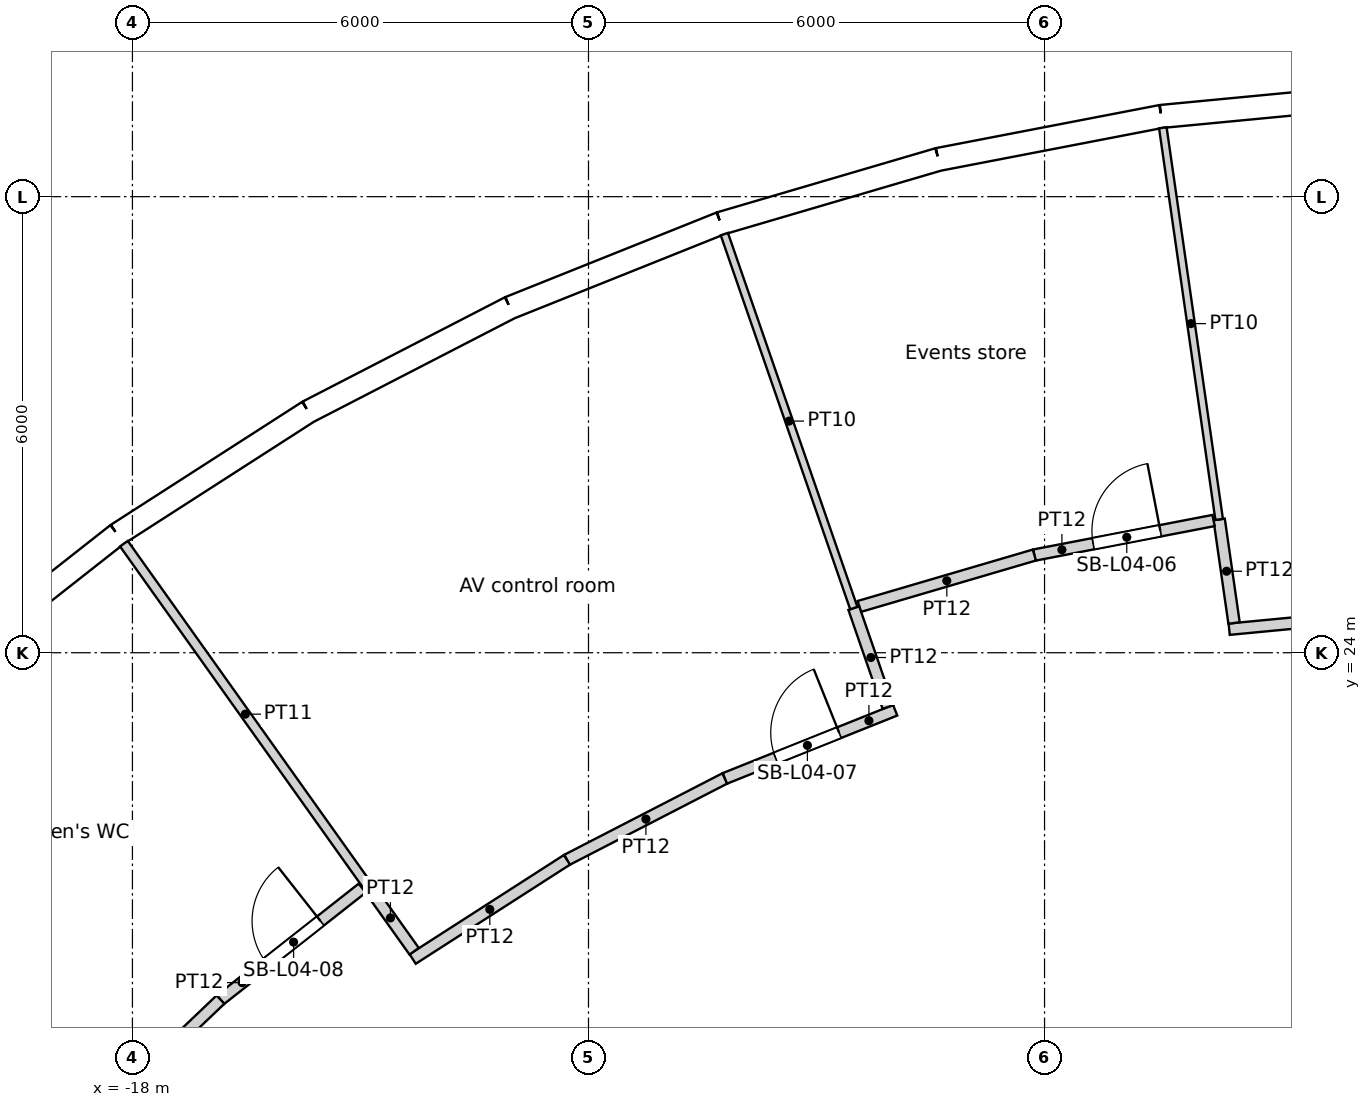
"""IFC4 building model, lengths in metres.
Left out: names, types, materials, properties, quantities, classifications, styles, units other than length and angle.
Written with IfcOpenShell. Run it as: python <this file> out.ifc"""

import sys

from ifc_helpers import new_model, si_unit, direction, frame, frame_2d, origin, origin_2d, place, context, subcontext, project, spatial, rectangle, circle, extrude, element, fill, save


model = new_model("IFC4")
c1 = context("Model", 3, precision=1e-05, world=origin(), true_north=direction((0.0, 1.0)))
c2 = subcontext(c1, "Body", "Model", "MODEL_VIEW")
j1 = project(units=[si_unit("LENGTHUNIT", "METRE"), si_unit("PLANEANGLEUNIT", "RADIAN")], contexts=[c1])
p1 = place(None, origin())
s1 = spatial("IfcSite", under=j1, at=p1, CompositionType="ELEMENT")
p2 = place(p1, origin())
s2 = spatial("IfcBuilding", under=s1, at=p2, CompositionType="ELEMENT")
p3 = place(p2, frame((0.0, 0.0, 23.4)))
s3 = spatial("IfcBuildingStorey", under=s2, at=p3, CompositionType="ELEMENT", Elevation=23.4)
for number, where, z_axis, x_axis in (
    (1, (-4.309, 29.966, 0.0), (0.0, 0.0, 1.0), (1.0, 0.0, 0.0)),
    (2, (-9.902, 28.61, 0.0), (0.0, 0.0, 1.0), (1.0, 0.0, 0.0)),
    (3, (-15.137, 26.219, 0.0), (0.0, 0.0, 1.0), (1.0, 0.0, 0.0)),
):
    element("IfcColumn", number, at=place(p3, frame(where, z_axis=z_axis, x_axis=x_axis)), inside=s3, PredefinedType="COLUMN", context=c2, shape_type="SweptSolid", body=[
        extrude(circle(Radius=0.7, at=origin_2d()), origin(), (0.0, 0.0, 1.0), 4.8),
    ])
for number, where, z_axis, x_axis in (
    (4, (-7.04, 23.516, 0.0), (0.0, 0.0, 1.0), (1.0, 0.0, 0.0)),
    (5, (-12.274, 21.259, 0.0), (0.0, 0.0, 1.0), (1.0, 0.0, 0.0)),
):
    element("IfcColumn", number, at=place(p3, frame(where, z_axis=z_axis, x_axis=x_axis)), inside=s3, PredefinedType="COLUMN", context=c2, shape_type="SweptSolid", body=[
        extrude(circle(Radius=0.75, at=origin_2d()), origin(), (0.0, 0.0, 1.0), 4.8),
    ])
p4 = place(p3, frame((-4.188, 18.35, 0.0), z_axis=(0.0, 0.0, 1.0), x_axis=(1.0, 0.0, 0.0)))
e6 = element("IfcColumn", 6, at=p4, inside=s3, PredefinedType="COLUMN", context=c2, shape_type="SweptSolid", body=[
    extrude(circle(Radius=0.8, at=origin_2d()), origin(), (0.0, 0.0, 1.0), 4.8),
])
p5 = place(p3, frame((-1.493, 31.339, 0.0), z_axis=(0.0, 0.0, 1.0), x_axis=(-0.99547560533, -0.095017467833, 0.0)))
e7 = element("IfcWall", 7, at=p5, inside=s3, PredefinedType="SOLIDWALL", context=c2, shape_type="SweptSolid", body=[
    extrude(rectangle(XDim=2.986, YDim=0.3, at=frame_2d((1.493, 0.0))), origin(), (0.0, 0.0, 1.0), 4.35),
])
p6 = place(p5, frame((1.493, 0.0, 2.0)))
e8 = element("IfcOpeningElement", 8, at=p6, cuts=e7, PredefinedType="OPENING", context=c2, shape_type="SweptSolid", body=[
    extrude(circle(Radius=1.2, at=origin_2d()), frame((0.0, 0.16, 0.0), z_axis=(0.0, -1.0, 0.0), x_axis=(1.0, 0.0, 0.0)), (0.0, 0.0, 1.0), 0.32),
])
p7 = place(p3, frame((-4.465, 31.055, 0.0), z_axis=(0.0, 0.0, 1.0), x_axis=(-0.981918853666, -0.189302310646, 0.0)))
e9 = element("IfcWall", 9, at=p7, inside=s3, PredefinedType="SOLIDWALL", context=c2, shape_type="SweptSolid", body=[
    extrude(rectangle(XDim=2.986, YDim=0.3, at=frame_2d((1.493, 0.0))), origin(), (0.0, 0.0, 1.0), 3.85),
])
p8 = place(p7, frame((1.493, 0.0, 2.0)))
e10 = element("IfcOpeningElement", 10, at=p8, cuts=e9, PredefinedType="OPENING", context=c2, shape_type="SweptSolid", body=[
    extrude(circle(Radius=1.2, at=origin_2d()), frame((0.0, 0.16, 0.0), z_axis=(0.0, -1.0, 0.0), x_axis=(1.0, 0.0, 0.0)), (0.0, 0.0, 1.0), 0.32),
])
p9 = place(p3, frame((-7.397, 30.49, 0.0), z_axis=(0.0, 0.0, 1.0), x_axis=(-0.959502108153, -0.281701445593, 0.0)))
e11 = element("IfcWall", 11, at=p9, inside=s3, PredefinedType="SOLIDWALL", context=c2, shape_type="SweptSolid", body=[
    extrude(rectangle(XDim=2.986, YDim=0.3, at=frame_2d((1.493, 0.0))), origin(), (0.0, 0.0, 1.0), 4.35),
])
p10 = place(p9, frame((1.493, 0.0, 2.0)))
e12 = element("IfcOpeningElement", 12, at=p10, cuts=e11, PredefinedType="OPENING", context=c2, shape_type="SweptSolid", body=[
    extrude(circle(Radius=1.2, at=origin_2d()), frame((0.0, 0.16, 0.0), z_axis=(0.0, -1.0, 0.0), x_axis=(1.0, 0.0, 0.0)), (0.0, 0.0, 1.0), 0.32),
])
p11 = place(p3, frame((-10.261, 29.649, 0.0), z_axis=(0.0, 0.0, 1.0), x_axis=(-0.928380795373, -0.371630325434, 0.0)))
e13 = element("IfcWall", 13, at=p11, inside=s3, PredefinedType="SOLIDWALL", context=c2, shape_type="SweptSolid", body=[
    extrude(rectangle(XDim=2.986, YDim=0.3, at=frame_2d((1.493, 0.0))), origin(), (0.0, 0.0, 1.0), 4.35),
])
p12 = place(p11, frame((1.493, 0.0, 2.0)))
e14 = element("IfcOpeningElement", 14, at=p12, cuts=e13, PredefinedType="OPENING", context=c2, shape_type="SweptSolid", body=[
    extrude(circle(Radius=1.2, at=origin_2d()), frame((0.0, 0.16, 0.0), z_axis=(0.0, -1.0, 0.0), x_axis=(1.0, 0.0, 0.0)), (0.0, 0.0, 1.0), 0.32),
])
p13 = place(p3, frame((-13.033, 28.539, 0.0), z_axis=(0.0, 0.0, 1.0), x_axis=(-0.888831268481, -0.458234630043, 0.0)))
e15 = element("IfcWall", 15, at=p13, inside=s3, PredefinedType="SOLIDWALL", context=c2, shape_type="SweptSolid", body=[
    extrude(rectangle(XDim=2.986, YDim=0.3, at=frame_2d((1.493, 0.0))), origin(), (0.0, 0.0, 1.0), 3.85),
])
p14 = place(p13, frame((1.493, 0.0, 2.0)))
e16 = element("IfcOpeningElement", 16, at=p14, cuts=e15, PredefinedType="OPENING", context=c2, shape_type="SweptSolid", body=[
    extrude(circle(Radius=1.2, at=origin_2d()), frame((0.0, 0.16, 0.0), z_axis=(0.0, -1.0, 0.0), x_axis=(1.0, 0.0, 0.0)), (0.0, 0.0, 1.0), 0.32),
])
p15 = place(p3, frame((-15.687, 27.171, 0.0), z_axis=(0.0, 0.0, 1.0), x_axis=(-0.841242231846, -0.540658401727, 0.0)))
e17 = element("IfcWall", 17, at=p15, inside=s3, PredefinedType="SOLIDWALL", context=c2, shape_type="SweptSolid", body=[
    extrude(rectangle(XDim=2.986, YDim=0.3, at=frame_2d((1.493, 0.0))), origin(), (0.0, 0.0, 1.0), 4.35),
])
p16 = place(p15, frame((1.493, 0.0, 2.0)))
e18 = element("IfcOpeningElement", 18, at=p16, cuts=e17, PredefinedType="OPENING", context=c2, shape_type="SweptSolid", body=[
    extrude(circle(Radius=1.2, at=origin_2d()), frame((0.0, 0.16, 0.0), z_axis=(0.0, -1.0, 0.0), x_axis=(1.0, 0.0, 0.0)), (0.0, 0.0, 1.0), 0.32),
])
p17 = place(p3, frame((-18.199, 25.557, 0.0), z_axis=(0.0, 0.0, 1.0), x_axis=(-0.786043032847, -0.618171780747, 0.0)))
e19 = element("IfcWall", 19, at=p17, inside=s3, PredefinedType="SOLIDWALL", context=c2, shape_type="SweptSolid", body=[
    extrude(rectangle(XDim=2.986, YDim=0.3, at=frame_2d((1.493, 0.0))), origin(), (0.0, 0.0, 1.0), 4.35),
])
p18 = place(p17, frame((1.493, 0.0, 2.0)))
e20 = element("IfcOpeningElement", 20, at=p18, cuts=e19, PredefinedType="OPENING", context=c2, shape_type="SweptSolid", body=[
    extrude(circle(Radius=1.2, at=origin_2d()), frame((0.0, 0.16, 0.0), z_axis=(0.0, -1.0, 0.0), x_axis=(1.0, 0.0, 0.0)), (0.0, 0.0, 1.0), 0.32),
])
p19 = place(p3, frame((-18.112, 25.435, 0.0), z_axis=(0.0, 0.0, 1.0), x_axis=(0.580038022369, -0.814589401236, 0.0)))
e21 = element("IfcWall", 21, at=p19, inside=s3, PredefinedType="PARTITIONING", context=c2, shape_type="SweptSolid", body=[
    extrude(rectangle(XDim=5.506, YDim=0.125, at=frame_2d((2.753, 0.0))), origin(), (0.0, 0.0, 1.0), 3.75),
])
p20 = place(p3, frame((-16.842, 19.436, 0.0), z_axis=(0.0, 0.0, 1.0), x_axis=(-0.723748787545, -0.690063542384, 0.0)))
e22 = element("IfcWall", 22, at=p20, inside=s3, PredefinedType="PARTITIONING", context=c2, shape_type="SweptSolid", body=[
    extrude(rectangle(XDim=2.522, YDim=0.15, at=frame_2d((1.261, 0.0))), origin(), (0.0, 0.0, 1.0), 3.75),
])
p21 = place(p3, frame((-16.842, 19.436, 0.0), z_axis=(0.0, 0.0, 1.0), x_axis=(0.786071894696, 0.618135079387, 0.0)))
e23 = element("IfcWall", 23, at=p21, inside=s3, PredefinedType="PARTITIONING", context=c2, shape_type="SweptSolid", body=[
    extrude(rectangle(XDim=2.373, YDim=0.15, at=frame_2d((1.186, 0.0))), origin(), (0.0, 0.0, 1.0), 3.75),
])
p22 = place(p21, frame((0.774, 0.0, 0.0)))
e24 = element("IfcOpeningElement", 24, at=p22, cuts=e23, PredefinedType="OPENING", context=c2, shape_type="SweptSolid", body=[
    extrude(rectangle(XDim=0.9, YDim=2.1, at=frame_2d((0.45, 1.05))), frame((0.0, 0.075, 0.0), z_axis=(0.0, -1.0, 0.0), x_axis=(1.0, 0.0, 0.0)), (0.0, 0.0, 1.0), 0.15),
])
p23 = place(p3, frame((-14.918, 20.949, 0.0), z_axis=(0.0, 0.0, 1.0), x_axis=(0.580035908562, -0.814590906393, 0.0)))
e25 = element("IfcWall", 25, at=p23, inside=s3, PredefinedType="PARTITIONING", context=c2, shape_type="SweptSolid", body=[
    extrude(rectangle(XDim=1.076, YDim=0.15, at=frame_2d((0.538, 0.0))), origin(), (0.0, 0.0, 1.0), 3.75),
])
p24 = place(p3, frame((-12.283, 21.275, 0.0), z_axis=(0.0, 0.0, 1.0), x_axis=(-0.8412573693, -0.540634847747, 0.0)))
e26 = element("IfcWall", 26, at=p24, inside=s3, PredefinedType="PARTITIONING", context=c2, shape_type="SweptSolid", body=[
    extrude(rectangle(XDim=2.413, YDim=0.15, at=frame_2d((1.207, 0.0))), origin(), (0.0, 0.0, 1.0), 3.75),
])
p25 = place(p3, frame((-10.212, 29.507, 0.0), z_axis=(0.0, 0.0, 1.0), x_axis=(0.327054188725, -0.945005586035, 0.0)))
e27 = element("IfcWall", 27, at=p25, inside=s3, PredefinedType="PARTITIONING", context=c2, shape_type="SweptSolid", body=[
    extrude(rectangle(XDim=5.206, YDim=0.1, at=frame_2d((2.603, 0.0))), origin(), (0.0, 0.0, 1.0), 3.75),
])
p26 = place(p3, frame((-10.205, 22.347, 0.0), z_axis=(0.0, 0.0, 1.0), x_axis=(-0.888845697941, -0.458206640339, 0.0)))
e28 = element("IfcWall", 28, at=p26, inside=s3, PredefinedType="PARTITIONING", context=c2, shape_type="SweptSolid", body=[
    extrude(rectangle(XDim=2.338, YDim=0.15, at=frame_2d((1.169, 0.0))), origin(), (0.0, 0.0, 1.0), 3.75),
])
p27 = place(p3, frame((-8.51, 24.587, 0.0), z_axis=(0.0, 0.0, 1.0), x_axis=(0.327061828961, -0.945002941814, 0.0)))
e29 = element("IfcWall", 29, at=p27, inside=s3, PredefinedType="PARTITIONING", context=c2, shape_type="SweptSolid", body=[
    extrude(rectangle(XDim=1.376, YDim=0.15, at=frame_2d((0.688, 0.0))), origin(), (0.0, 0.0, 1.0), 3.75),
])
p28 = place(p3, frame((-10.205, 22.347, 0.0), z_axis=(0.0, 0.0, 1.0), x_axis=(0.928371979915, 0.371652346837, 0.0)))
e30 = element("IfcWall", 30, at=p28, inside=s3, PredefinedType="PARTITIONING", context=c2, shape_type="SweptSolid", body=[
    extrude(rectangle(XDim=2.413, YDim=0.15, at=frame_2d((1.207, 0.0))), origin(), (0.0, 0.0, 1.0), 3.75),
])
p29 = place(p28, frame((0.719, 0.0, 0.0)))
e31 = element("IfcOpeningElement", 31, at=p29, cuts=e30, PredefinedType="OPENING", context=c2, shape_type="SweptSolid", body=[
    extrude(rectangle(XDim=0.9, YDim=2.1, at=frame_2d((0.45, 1.05))), frame((0.0, 0.075, 0.0), z_axis=(0.0, -1.0, 0.0), x_axis=(1.0, 0.0, 0.0)), (0.0, 0.0, 1.0), 0.15),
])
p30 = place(p3, frame((-6.134, 25.285, 0.0), z_axis=(0.0, 0.0, 1.0), x_axis=(-0.959511102272, -0.281670808954, 0.0)))
e32 = element("IfcWall", 32, at=p30, inside=s3, PredefinedType="PARTITIONING", context=c2, shape_type="SweptSolid", body=[
    extrude(rectangle(XDim=2.401, YDim=0.15, at=frame_2d((1.2, 0.0))), origin(), (0.0, 0.0, 1.0), 3.75),
])
p31 = place(p3, frame((-4.444, 30.906, 0.0), z_axis=(0.0, 0.0, 1.0), x_axis=(0.142281368884, -0.989826253475, 0.0)))
e33 = element("IfcWall", 33, at=p31, inside=s3, PredefinedType="PARTITIONING", context=c2, shape_type="SweptSolid", body=[
    extrude(rectangle(XDim=5.206, YDim=0.1, at=frame_2d((2.603, 0.0))), origin(), (0.0, 0.0, 1.0), 3.75),
])
p32 = place(p3, frame((-6.134, 25.285, 0.0), z_axis=(0.0, 0.0, 1.0), x_axis=(0.981929480724, 0.189247179332, 0.0)))
e34 = element("IfcWall", 34, at=p32, inside=s3, PredefinedType="PARTITIONING", context=c2, shape_type="SweptSolid", body=[
    extrude(rectangle(XDim=2.401, YDim=0.15, at=frame_2d((1.2, 0.0))), origin(), (0.0, 0.0, 1.0), 3.75),
])
p33 = place(p32, frame((0.788, 0.0, 0.0)))
e35 = element("IfcOpeningElement", 35, at=p33, cuts=e34, PredefinedType="OPENING", context=c2, shape_type="SweptSolid", body=[
    extrude(rectangle(XDim=0.9, YDim=2.1, at=frame_2d((0.45, 1.05))), frame((0.0, 0.075, 0.0), z_axis=(0.0, -1.0, 0.0), x_axis=(1.0, 0.0, 0.0)), (0.0, 0.0, 1.0), 0.15),
])
p34 = place(p3, frame((-3.703, 25.753, 0.0), z_axis=(0.0, 0.0, 1.0), x_axis=(0.142414461885, -0.989807113051, 0.0)))
e36 = element("IfcWall", 36, at=p34, inside=s3, PredefinedType="PARTITIONING", context=c2, shape_type="SweptSolid", body=[
    extrude(rectangle(XDim=1.376, YDim=0.15, at=frame_2d((0.688, 0.0))), origin(), (0.0, 0.0, 1.0), 3.75),
])
p35 = place(p3, frame((-1.169, 24.539, 0.0), z_axis=(0.0, 0.0, 1.0), x_axis=(-0.995475896214, -0.095014420263, 0.0)))
e37 = element("IfcWall", 37, at=p35, inside=s3, PredefinedType="PARTITIONING", context=c2, shape_type="SweptSolid", body=[
    extrude(rectangle(XDim=2.413, YDim=0.15, at=frame_2d((1.207, 0.0))), origin(), (0.0, 0.0, 1.0), 3.75),
])
p36 = place(p6, origin())
e38 = element("IfcWindow", 38, at=p36, inside=s3, PartitioningType="SINGLE_PANEL", PredefinedType="WINDOW", context=c2, shape_type="SweptSolid", body=[
    extrude(circle(Radius=1.2, at=origin_2d()), frame((0.0, 0.12, 0.0), z_axis=(0.0, -1.0, 0.0), x_axis=(1.0, 0.0, 0.0)), (0.0, 0.0, 1.0), 0.1),
])
fill(e8, e38)
p37 = place(p8, origin())
e39 = element("IfcWindow", 39, at=p37, inside=s3, PartitioningType="SINGLE_PANEL", PredefinedType="WINDOW", context=c2, shape_type="SweptSolid", body=[
    extrude(circle(Radius=1.2, at=origin_2d()), frame((0.0, 0.12, 0.0), z_axis=(0.0, -1.0, 0.0), x_axis=(1.0, 0.0, 0.0)), (0.0, 0.0, 1.0), 0.1),
])
fill(e10, e39)
p38 = place(p10, origin())
e40 = element("IfcWindow", 40, at=p38, inside=s3, PartitioningType="SINGLE_PANEL", PredefinedType="WINDOW", context=c2, shape_type="SweptSolid", body=[
    extrude(circle(Radius=1.2, at=origin_2d()), frame((0.0, 0.12, 0.0), z_axis=(0.0, -1.0, 0.0), x_axis=(1.0, 0.0, 0.0)), (0.0, 0.0, 1.0), 0.1),
])
fill(e12, e40)
p39 = place(p12, origin())
e41 = element("IfcWindow", 41, at=p39, inside=s3, PartitioningType="SINGLE_PANEL", PredefinedType="WINDOW", context=c2, shape_type="SweptSolid", body=[
    extrude(circle(Radius=1.2, at=origin_2d()), frame((0.0, 0.12, 0.0), z_axis=(0.0, -1.0, 0.0), x_axis=(1.0, 0.0, 0.0)), (0.0, 0.0, 1.0), 0.1),
])
fill(e14, e41)
p40 = place(p14, origin())
e42 = element("IfcWindow", 42, at=p40, inside=s3, PartitioningType="SINGLE_PANEL", PredefinedType="WINDOW", context=c2, shape_type="SweptSolid", body=[
    extrude(circle(Radius=1.2, at=origin_2d()), frame((0.0, 0.12, 0.0), z_axis=(0.0, -1.0, 0.0), x_axis=(1.0, 0.0, 0.0)), (0.0, 0.0, 1.0), 0.1),
])
fill(e16, e42)
p41 = place(p16, origin())
e43 = element("IfcWindow", 43, at=p41, inside=s3, PartitioningType="SINGLE_PANEL", PredefinedType="WINDOW", context=c2, shape_type="SweptSolid", body=[
    extrude(circle(Radius=1.2, at=origin_2d()), frame((0.0, 0.12, 0.0), z_axis=(0.0, -1.0, 0.0), x_axis=(1.0, 0.0, 0.0)), (0.0, 0.0, 1.0), 0.1),
])
fill(e18, e43)
p42 = place(p18, origin())
e44 = element("IfcWindow", 44, at=p42, inside=s3, PartitioningType="SINGLE_PANEL", PredefinedType="WINDOW", context=c2, shape_type="SweptSolid", body=[
    extrude(circle(Radius=1.2, at=origin_2d()), frame((0.0, 0.12, 0.0), z_axis=(0.0, -1.0, 0.0), x_axis=(1.0, 0.0, 0.0)), (0.0, 0.0, 1.0), 0.1),
])
fill(e20, e44)
p43 = place(p33, origin())
e45 = element("IfcDoor", 45, at=p43, inside=s3, OperationType="SINGLE_SWING_RIGHT", PredefinedType="DOOR", context=c2, shape_type="SweptSolid", body=[
    extrude(rectangle(XDim=0.9, YDim=2.1, at=frame_2d((0.45, 1.05))), frame((0.0, 0.025, 0.0), z_axis=(0.0, -1.0, 0.0), x_axis=(1.0, 0.0, 0.0)), (0.0, 0.0, 1.0), 0.05),
])
fill(e35, e45)
p44 = place(p29, origin())
e46 = element("IfcDoor", 46, at=p44, inside=s3, OperationType="SINGLE_SWING_RIGHT", PredefinedType="DOOR", context=c2, shape_type="SweptSolid", body=[
    extrude(rectangle(XDim=0.9, YDim=2.1, at=frame_2d((0.45, 1.05))), frame((0.0, 0.025, 0.0), z_axis=(0.0, -1.0, 0.0), x_axis=(1.0, 0.0, 0.0)), (0.0, 0.0, 1.0), 0.05),
])
fill(e31, e46)
p45 = place(p22, origin())
e47 = element("IfcDoor", 47, at=p45, inside=s3, OperationType="SINGLE_SWING_RIGHT", PredefinedType="DOOR", context=c2, shape_type="SweptSolid", body=[
    extrude(rectangle(XDim=0.9, YDim=2.1, at=frame_2d((0.45, 1.05))), frame((0.0, 0.025, 0.0), z_axis=(0.0, -1.0, 0.0), x_axis=(1.0, 0.0, 0.0)), (0.0, 0.0, 1.0), 0.05),
])
fill(e24, e47)
save(model, sys.argv[1])
